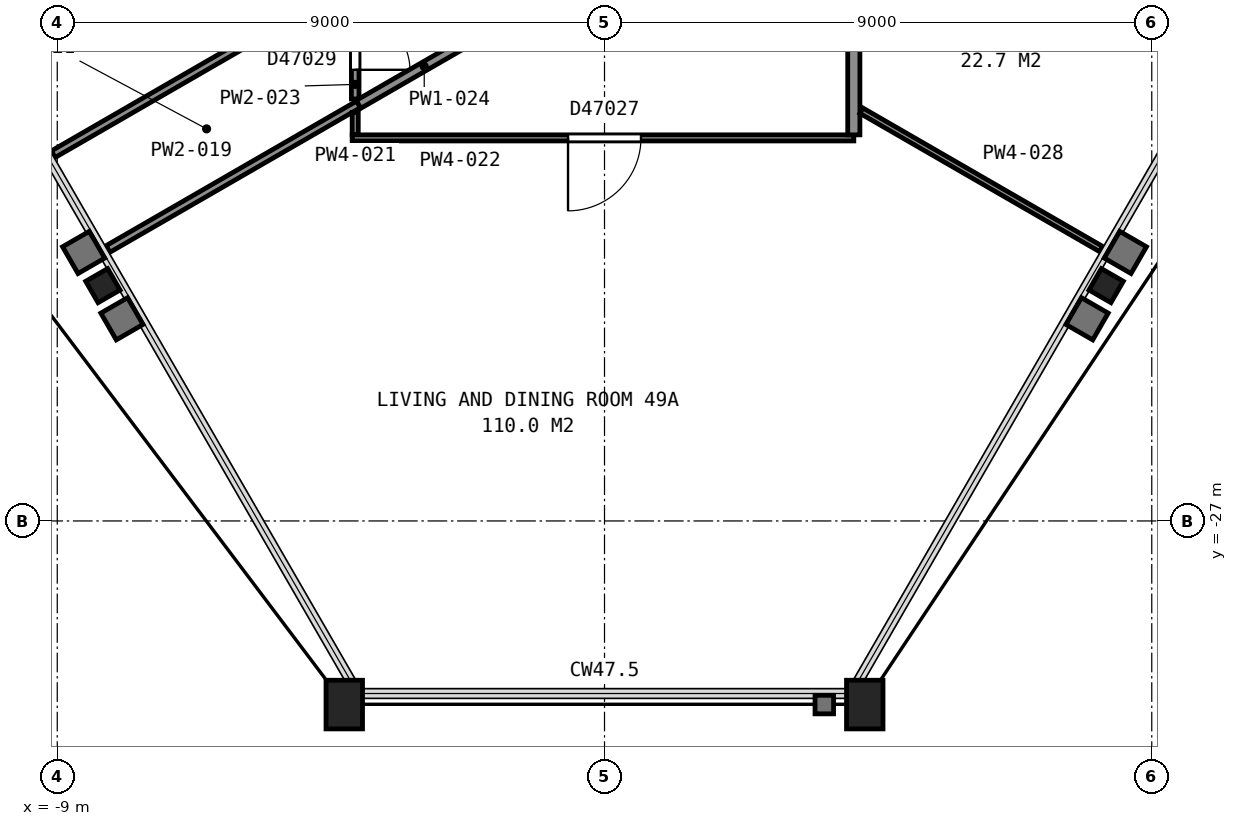
"""IFC4 building model, lengths in metres.
Left out: names, types, materials, properties, quantities, classifications, styles, units other than length and angle.
Written with IfcOpenShell. Run it as: python <this file> out.ifc"""

import sys

from ifc_helpers import new_model, si_unit, direction, frame, frame_2d, origin, origin_2d, place, context, subcontext, project, spatial, rectangle, hollow_rectangle, i_section, extrude, element, fill, save


model = new_model("IFC4")
c1 = context("Model", 3, precision=1e-05, world=origin(), true_north=direction((0.0, 1.0)))
c2 = subcontext(c1, "Body", "Model", "MODEL_VIEW")
j1 = project(units=[si_unit("LENGTHUNIT", "METRE"), si_unit("PLANEANGLEUNIT", "RADIAN")], contexts=[c1])
p1 = place(None, origin())
s1 = spatial("IfcSite", under=j1, at=p1, CompositionType="ELEMENT")
p2 = place(p1, origin())
s2 = spatial("IfcBuilding", under=s1, at=p2, CompositionType="ELEMENT")
p3 = place(p2, frame((0.0, 0.0, 196.9)))
s3 = spatial("IfcBuildingStorey", under=s2, at=p3, CompositionType="ELEMENT", Elevation=196.9)
p4 = place(p3, frame((-8.25, -23.13, 0.0), z_axis=(0.0, 0.0, 1.0), x_axis=(-0.5, 0.866025403784, 0.0)))
e1 = element("IfcColumn", 1, at=p4, inside=s3, PredefinedType="COLUMN", context=c2, shape_type="SweptSolid", body=[
    extrude(i_section(OverallWidth=0.406, OverallDepth=0.417, WebThickness=0.03, FlangeThickness=0.048, FilletRadius=0.015, at=origin_2d()), origin(), (0.0, 0.0, 1.0), 3.01),
])
for number, where, z_axis, x_axis in (
    (2, (-4.28, -30.02, 0.0), (0.0, 0.0, 1.0), (-1.0, 0.0, 0.0)),
    (3, (4.28, -30.02, 0.0), (0.0, 0.0, 1.0), (-1.0, 0.0, 0.0)),
):
    element("IfcColumn", number, at=place(p3, frame(where, z_axis=z_axis, x_axis=x_axis)), inside=s3, PredefinedType="COLUMN", context=c2, shape_type="SweptSolid", body=[
        extrude(hollow_rectangle(XDim=0.6, YDim=0.8, WallThickness=0.05, at=origin_2d()), origin(), (0.0, 0.0, 1.0), 3.7),
    ])
p5 = place(p3, frame((8.25, -23.13, 0.0), z_axis=(0.0, 0.0, 1.0), x_axis=(-0.5, -0.866025403784, 0.0)))
e4 = element("IfcColumn", 4, at=p5, inside=s3, PredefinedType="COLUMN", context=c2, shape_type="SweptSolid", body=[
    extrude(i_section(OverallWidth=0.406, OverallDepth=0.417, WebThickness=0.03, FlangeThickness=0.048, FilletRadius=0.015, at=origin_2d()), origin(), (0.0, 0.0, 1.0), 3.01),
])
p6 = place(p3, frame((-9.066, -20.968, 0.0), z_axis=(0.0, 0.0, 1.0), x_axis=(0.866023559602, 0.500003194204, 0.0)))
e5 = element("IfcWall", 5, at=p6, inside=s3, PredefinedType="PARTITIONING", context=c2, shape_type="SweptSolid", body=[
    extrude(rectangle(XDim=5.796, YDim=0.125, at=frame_2d((2.898, 0.0))), origin(), (0.0, 0.0, 1.0), 2.362),
])
p7 = place(p3, frame((-8.166, -22.527, 0.0), z_axis=(0.0, 0.0, 1.0), x_axis=(0.866042865666, 0.499969753915, 0.0)))
e6 = element("IfcWall", 6, at=p7, inside=s3, PredefinedType="PARTITIONING", context=c2, shape_type="SweptSolid", body=[
    extrude(rectangle(XDim=4.757, YDim=0.125, at=frame_2d((2.378, 0.0))), origin(), (0.0, 0.0, 1.0), 2.362),
])
p8 = place(p3, frame((-4.1, -20.65, 0.0), z_axis=(0.0, 0.0, 1.0), x_axis=(0.0, 1.0, 0.0)))
e7 = element("IfcWall", 7, at=p8, inside=s3, PredefinedType="PARTITIONING", context=c2, shape_type="SweptSolid", body=[
    extrude(rectangle(XDim=0.37, YDim=0.1, at=frame_2d((0.185, 0.0))), origin(), (0.0, 0.0, 1.0), 2.362),
])
p9 = place(p3, frame((4.1, -20.7, 0.0), z_axis=(0.0, 0.0, 1.0), x_axis=(-1.0, 0.0, 0.0)))
e8 = element("IfcWall", 8, at=p9, inside=s3, PredefinedType="PARTITIONING", context=c2, shape_type="SweptSolid", body=[
    extrude(rectangle(XDim=8.25, YDim=0.1, at=frame_2d((4.125, 0.0))), origin(), (0.0, 0.0, 1.0), 2.362),
])
p10 = place(p9, frame((3.5, 0.0, 0.0)))
e9 = element("IfcOpeningElement", 9, at=p10, cuts=e8, PredefinedType="OPENING", context=c2, shape_type="SweptSolid", body=[
    extrude(rectangle(XDim=1.2, YDim=2.1, at=frame_2d((0.6, 1.05))), frame((0.0, 0.06, 0.0), z_axis=(0.0, -1.0, 0.0), x_axis=(1.0, 0.0, 0.0)), (0.0, 0.0, 1.0), 0.12),
])
p11 = place(p3, frame((-4.1, -18.206, 0.0), z_axis=(0.0, 0.0, 1.0), x_axis=(0.0, -1.0, 0.0)))
e10 = element("IfcWall", 10, at=p11, inside=s3, PredefinedType="PARTITIONING", context=c2, shape_type="SweptSolid", body=[
    extrude(rectangle(XDim=1.854, YDim=0.125, at=frame_2d((0.927, 0.0))), origin(), (0.0, 0.0, 1.0), 2.362),
])
p12 = place(p11, frame((0.474, 0.0, 0.0)))
e11 = element("IfcOpeningElement", 11, at=p12, cuts=e10, PredefinedType="OPENING", context=c2, shape_type="SweptSolid", body=[
    extrude(rectangle(XDim=0.9, YDim=2.1, at=frame_2d((0.45, 1.05))), frame((0.0, 0.073, 0.0), z_axis=(0.0, -1.0, 0.0), x_axis=(1.0, 0.0, 0.0)), (0.0, 0.0, 1.0), 0.145),
])
p13 = place(p3, frame((-4.046, -20.149, 0.0), z_axis=(0.0, 0.0, 1.0), x_axis=(0.865916841101, 0.500187988959, 0.0)))
e12 = element("IfcWall", 12, at=p13, inside=s3, PredefinedType="PARTITIONING", context=c2, shape_type="SweptSolid", body=[
    extrude(rectangle(XDim=2.497, YDim=0.15, at=frame_2d((1.248, 0.0))), origin(), (0.0, 0.0, 1.0), 2.362),
])
p14 = place(p3, frame((4.1, -12.402, 0.0), z_axis=(0.0, 0.0, 1.0), x_axis=(0.0, -1.0, 0.0)))
e13 = element("IfcWall", 13, at=p14, inside=s3, PredefinedType="PARTITIONING", context=c2, shape_type="SweptSolid", body=[
    extrude(rectangle(XDim=8.248, YDim=0.2, at=frame_2d((4.124, 0.0))), origin(), (0.0, 0.0, 1.0), 2.362),
])
p15 = place(p14, frame((4.928, 0.0, 0.0)))
e14 = element("IfcOpeningElement", 14, at=p15, cuts=e13, PredefinedType="OPENING", context=c2, shape_type="SweptSolid", body=[
    extrude(rectangle(XDim=0.9, YDim=2.1, at=frame_2d((0.45, 1.05))), frame((0.0, 0.11, 0.0), z_axis=(0.0, -1.0, 0.0), x_axis=(1.0, 0.0, 0.0)), (0.0, 0.0, 1.0), 0.22),
])
p16 = place(p3, frame((4.225, -20.252, 0.0), z_axis=(0.0, 0.0, 1.0), x_axis=(0.866048884701, -0.499959327653, 0.0)))
e15 = element("IfcWall", 15, at=p16, inside=s3, PredefinedType="PARTITIONING", context=c2, shape_type="SweptSolid", body=[
    extrude(rectangle(XDim=4.55, YDim=0.1, at=frame_2d((2.275, 0.0))), origin(), (0.0, 0.0, 1.0), 2.362),
])
p17 = place(p10, origin())
e16 = element("IfcDoor", 16, at=p17, inside=s3, OperationType="SINGLE_SWING_RIGHT", PredefinedType="DOOR", context=c2, shape_type="SweptSolid", body=[
    extrude(rectangle(XDim=1.2, YDim=2.1, at=frame_2d((0.6, 1.05))), frame((0.0, 0.025, 0.0), z_axis=(0.0, -1.0, 0.0), x_axis=(1.0, 0.0, 0.0)), (0.0, 0.0, 1.0), 0.05),
])
fill(e9, e16)
p18 = place(p12, origin())
e17 = element("IfcDoor", 17, at=p18, inside=s3, OperationType="SINGLE_SWING_RIGHT", PredefinedType="DOOR", context=c2, shape_type="SweptSolid", body=[
    extrude(rectangle(XDim=0.9, YDim=2.1, at=frame_2d((0.45, 1.05))), frame((0.0, 0.025, 0.0), z_axis=(0.0, -1.0, 0.0), x_axis=(1.0, 0.0, 0.0)), (0.0, 0.0, 1.0), 0.05),
])
fill(e11, e17)
save(model, sys.argv[1])
